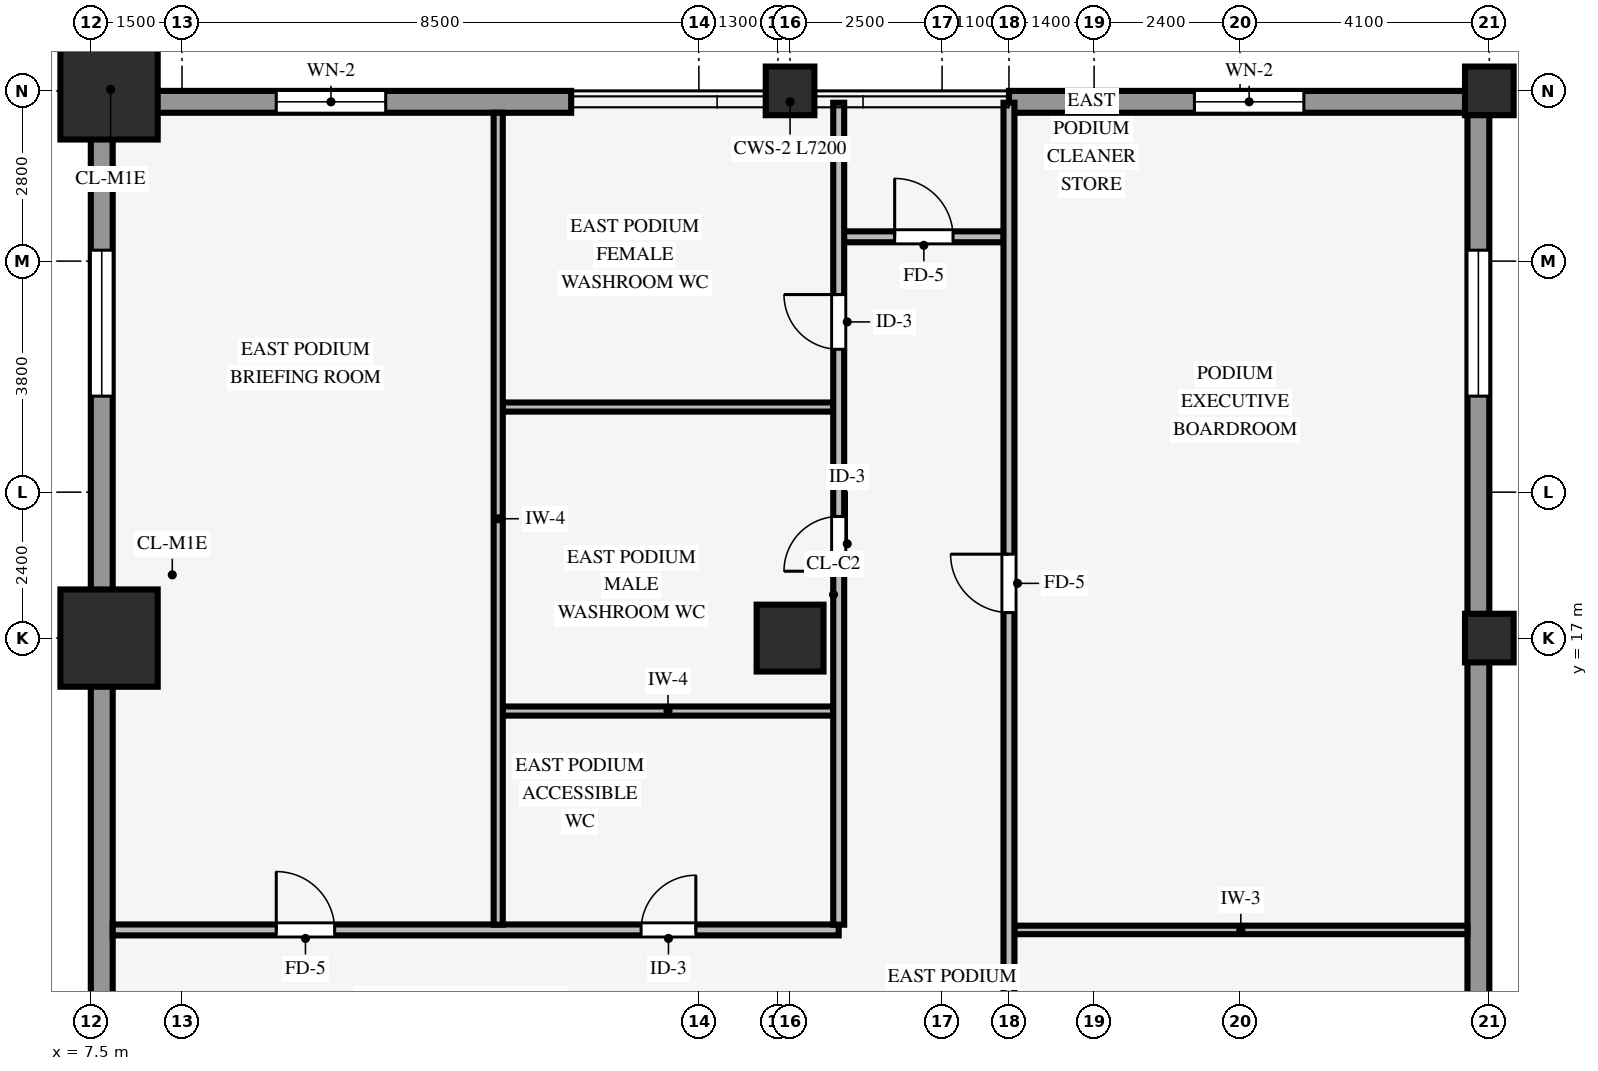
"""IFC4 building model, lengths in metres.
Left out: names, types, materials, properties, quantities, classifications, styles, units other than length and angle.
Written with IfcOpenShell. Run it as: python <this file> out.ifc"""

import sys

from ifc_helpers import new_model, si_unit, direction, frame, frame_2d, origin, origin_2d, place, context, subcontext, project, spatial, rectangle, hollow_rectangle, extrude, source, transform, mapped, element, fill, save


model = new_model("IFC4")
c1 = context("Model", 3, precision=1e-05, world=origin(), true_north=direction((0.0, 1.0)))
c2 = subcontext(c1, "Body", "Model", "MODEL_VIEW")
j1 = project(units=[si_unit("LENGTHUNIT", "METRE"), si_unit("PLANEANGLEUNIT", "RADIAN")], contexts=[c1])
p1 = place(None, origin())
s1 = spatial("IfcSite", under=j1, at=p1, CompositionType="ELEMENT")
p2 = place(p1, origin())
s2 = spatial("IfcBuilding", under=s1, at=p2, CompositionType="ELEMENT")
p3 = place(p2, frame((0.0, 0.0, 9.2)))
s3 = spatial("IfcBuildingStorey", under=s2, at=p3, CompositionType="ELEMENT", Elevation=9.2)
for number, where, z_axis, x_axis in (
    (1, (7.8, 17.0, 0.0), (0.0, 0.0, 1.0), (1.0, 0.0, 0.0)),
    (2, (7.8, 26.0, 0.0), (0.0, 0.0, 1.0), (1.0, 0.0, 0.0)),
):
    element("IfcColumn", number, at=place(p3, frame(where, z_axis=z_axis, x_axis=x_axis)), inside=s3, PredefinedType="COLUMN", context=c2, shape_type="SweptSolid", body=[
        extrude(rectangle(XDim=1.6, YDim=1.6, at=origin_2d()), origin(), (0.0, 0.0, 1.0), 4.28),
    ])
p4 = place(p3, frame((19.0, 17.0, 0.0), z_axis=(0.0, 0.0, 1.0), x_axis=(1.0, 0.0, 0.0)))
e3 = element("IfcColumn", 3, at=p4, inside=s3, PredefinedType="COLUMN", context=c2, shape_type="SweptSolid", body=[
    extrude(rectangle(XDim=1.1, YDim=1.1, at=origin_2d()), origin(), (0.0, 0.0, 1.0), 4.28),
])
for number, where, z_axis, x_axis in (
    (4, (19.0, 26.0, 0.0), (0.0, 0.0, 1.0), (1.0, 0.0, 0.0)),
    (5, (30.5, 17.0, 0.0), (0.0, 0.0, 1.0), (1.0, 0.0, 0.0)),
    (6, (30.5, 26.0, 0.0), (0.0, 0.0, 1.0), (1.0, 0.0, 0.0)),
):
    element("IfcColumn", number, at=place(p3, frame(where, z_axis=z_axis, x_axis=x_axis)), inside=s3, PredefinedType="COLUMN", context=c2, shape_type="SweptSolid", body=[
        extrude(hollow_rectangle(XDim=0.8, YDim=0.8, WallThickness=0.055, InnerFilletRadius=0.055, OuterFilletRadius=0.11, at=origin_2d()), origin(), (0.0, 0.0, 1.0), 4.28),
    ])
p5 = place(p3, frame((30.32, -25.644, 0.0), z_axis=(0.0, 0.0, 1.0), x_axis=(0.0, 1.0, 0.0)))
e7 = element("IfcWall", 7, at=p5, inside=s3, PredefinedType="STANDARD", context=c2, shape_type="SweptSolid", body=[
    extrude(rectangle(XDim=51.288, YDim=0.36, at=frame_2d((25.644, 0.0))), origin(), (0.0, 0.0, 1.0), 3.615),
])
p6 = place(p5, frame((2.264, 0.0, 0.85)))
e8 = element("IfcOpeningElement", 8, at=p6, cuts=e7, PredefinedType="OPENING", context=c2, shape_type="SweptSolid", body=[
    extrude(rectangle(XDim=2.4, YDim=2.45, at=frame_2d((1.2, 1.225))), frame((0.0, 0.19, 0.0), z_axis=(0.0, -1.0, 0.0), x_axis=(1.0, 0.0, 0.0)), (0.0, 0.0, 1.0), 0.38),
])
p7 = place(p5, frame((17.051, 0.0, 0.85)))
e9 = element("IfcOpeningElement", 9, at=p7, cuts=e7, PredefinedType="OPENING", context=c2, shape_type="SweptSolid", body=[
    extrude(rectangle(XDim=2.4, YDim=2.45, at=frame_2d((1.2, 1.225))), frame((0.0, 0.19, 0.0), z_axis=(0.0, -1.0, 0.0), x_axis=(1.0, 0.0, 0.0)), (0.0, 0.0, 1.0), 0.38),
])
p8 = place(p5, frame((21.979, 0.0, 0.85)))
e10 = element("IfcOpeningElement", 10, at=p8, cuts=e7, PredefinedType="OPENING", context=c2, shape_type="SweptSolid", body=[
    extrude(rectangle(XDim=2.4, YDim=2.45, at=frame_2d((1.2, 1.225))), frame((0.0, 0.19, 0.0), z_axis=(0.0, -1.0, 0.0), x_axis=(1.0, 0.0, 0.0)), (0.0, 0.0, 1.0), 0.38),
])
p9 = place(p5, frame((26.908, 0.0, 0.85)))
e11 = element("IfcOpeningElement", 11, at=p9, cuts=e7, PredefinedType="OPENING", context=c2, shape_type="SweptSolid", body=[
    extrude(rectangle(XDim=2.4, YDim=2.45, at=frame_2d((1.2, 1.225))), frame((0.0, 0.19, 0.0), z_axis=(0.0, -1.0, 0.0), x_axis=(1.0, 0.0, 0.0)), (0.0, 0.0, 1.0), 0.38),
])
p10 = place(p5, frame((31.837, 0.0, 0.85)))
e12 = element("IfcOpeningElement", 12, at=p10, cuts=e7, PredefinedType="OPENING", context=c2, shape_type="SweptSolid", body=[
    extrude(rectangle(XDim=2.4, YDim=2.45, at=frame_2d((1.2, 1.225))), frame((0.0, 0.19, 0.0), z_axis=(0.0, -1.0, 0.0), x_axis=(1.0, 0.0, 0.0)), (0.0, 0.0, 1.0), 0.38),
])
p11 = place(p5, frame((46.624, 0.0, 0.85)))
e13 = element("IfcOpeningElement", 13, at=p11, cuts=e7, PredefinedType="OPENING", context=c2, shape_type="SweptSolid", body=[
    extrude(rectangle(XDim=2.4, YDim=2.45, at=frame_2d((1.2, 1.225))), frame((0.0, 0.19, 0.0), z_axis=(0.0, -1.0, 0.0), x_axis=(1.0, 0.0, 0.0)), (0.0, 0.0, 1.0), 0.38),
])
p12 = place(p3, frame((7.5, 25.82, 0.0), z_axis=(0.0, 0.0, 1.0), x_axis=(1.0, 0.0, 0.0)))
e14 = element("IfcWall", 14, at=p12, inside=s3, PredefinedType="STANDARD", context=c2, shape_type="SweptSolid", body=[
    extrude(rectangle(XDim=7.9, YDim=0.36, at=frame_2d((3.95, 0.0))), origin(), (0.0, 0.0, 1.0), 3.615),
])
p13 = place(p12, frame((3.05, 0.0, 0.85)))
e15 = element("IfcOpeningElement", 15, at=p13, cuts=e14, PredefinedType="OPENING", context=c2, shape_type="SweptSolid", body=[
    extrude(rectangle(XDim=1.8, YDim=2.35, at=frame_2d((0.9, 1.175))), frame((0.0, 0.19, 0.0), z_axis=(0.0, -1.0, 0.0), x_axis=(1.0, 0.0, 0.0)), (0.0, 0.0, 1.0), 0.38),
])
p14 = place(p3, frame((22.6, 25.82, 0.0), z_axis=(0.0, 0.0, 1.0), x_axis=(1.0, 0.0, 0.0)))
e16 = element("IfcWall", 16, at=p14, inside=s3, PredefinedType="STANDARD", context=c2, shape_type="SweptSolid", body=[
    extrude(rectangle(XDim=7.9, YDim=0.36, at=frame_2d((3.95, 0.0))), origin(), (0.0, 0.0, 1.0), 3.615),
])
p15 = place(p14, frame((3.05, 0.0, 0.85)))
e17 = element("IfcOpeningElement", 17, at=p15, cuts=e16, PredefinedType="OPENING", context=c2, shape_type="SweptSolid", body=[
    extrude(rectangle(XDim=1.8, YDim=2.35, at=frame_2d((0.9, 1.175))), frame((0.0, 0.19, 0.0), z_axis=(0.0, -1.0, 0.0), x_axis=(1.0, 0.0, 0.0)), (0.0, 0.0, 1.0), 0.38),
])
p16 = place(p3, frame((7.68, -25.644, 0.0), z_axis=(0.0, 0.0, 1.0), x_axis=(0.0, 1.0, 0.0)))
e18 = element("IfcWall", 18, at=p16, inside=s3, PredefinedType="STANDARD", context=c2, shape_type="SweptSolid", body=[
    extrude(rectangle(XDim=51.288, YDim=0.36, at=frame_2d((25.644, 0.0))), origin(), (0.0, 0.0, 1.0), 3.649),
])
p17 = place(p16, frame((2.264, 0.0, 0.85)))
e19 = element("IfcOpeningElement", 19, at=p17, cuts=e18, PredefinedType="OPENING", context=c2, shape_type="SweptSolid", body=[
    extrude(rectangle(XDim=2.4, YDim=2.45, at=frame_2d((1.2, 1.225))), frame((0.0, 0.19, 0.0), z_axis=(0.0, -1.0, 0.0), x_axis=(1.0, 0.0, 0.0)), (0.0, 0.0, 1.0), 0.38),
])
p18 = place(p16, frame((17.051, 0.0, 0.85)))
e20 = element("IfcOpeningElement", 20, at=p18, cuts=e18, PredefinedType="OPENING", context=c2, shape_type="SweptSolid", body=[
    extrude(rectangle(XDim=2.4, YDim=2.45, at=frame_2d((1.2, 1.225))), frame((0.0, 0.19, 0.0), z_axis=(0.0, -1.0, 0.0), x_axis=(1.0, 0.0, 0.0)), (0.0, 0.0, 1.0), 0.38),
])
p19 = place(p16, frame((21.979, 0.0, 0.85)))
e21 = element("IfcOpeningElement", 21, at=p19, cuts=e18, PredefinedType="OPENING", context=c2, shape_type="SweptSolid", body=[
    extrude(rectangle(XDim=2.4, YDim=2.45, at=frame_2d((1.2, 1.225))), frame((0.0, 0.19, 0.0), z_axis=(0.0, -1.0, 0.0), x_axis=(1.0, 0.0, 0.0)), (0.0, 0.0, 1.0), 0.38),
])
p20 = place(p16, frame((26.908, 0.0, 0.85)))
e22 = element("IfcOpeningElement", 22, at=p20, cuts=e18, PredefinedType="OPENING", context=c2, shape_type="SweptSolid", body=[
    extrude(rectangle(XDim=2.4, YDim=2.45, at=frame_2d((1.2, 1.225))), frame((0.0, 0.19, 0.0), z_axis=(0.0, -1.0, 0.0), x_axis=(1.0, 0.0, 0.0)), (0.0, 0.0, 1.0), 0.38),
])
p21 = place(p16, frame((31.837, 0.0, 0.85)))
e23 = element("IfcOpeningElement", 23, at=p21, cuts=e18, PredefinedType="OPENING", context=c2, shape_type="SweptSolid", body=[
    extrude(rectangle(XDim=2.4, YDim=2.45, at=frame_2d((1.2, 1.225))), frame((0.0, 0.19, 0.0), z_axis=(0.0, -1.0, 0.0), x_axis=(1.0, 0.0, 0.0)), (0.0, 0.0, 1.0), 0.38),
])
p22 = place(p16, frame((46.624, 0.0, 0.85)))
e24 = element("IfcOpeningElement", 24, at=p22, cuts=e18, PredefinedType="OPENING", context=c2, shape_type="SweptSolid", body=[
    extrude(rectangle(XDim=2.4, YDim=2.45, at=frame_2d((1.2, 1.225))), frame((0.0, 0.19, 0.0), z_axis=(0.0, -1.0, 0.0), x_axis=(1.0, 0.0, 0.0)), (0.0, 0.0, 1.0), 0.38),
])
p23 = place(p3, frame((7.86, 12.2, 0.0), z_axis=(0.0, 0.0, 1.0), x_axis=(1.0, 0.0, 0.0)))
e25 = element("IfcWall", 25, at=p23, inside=s3, PredefinedType="PARTITIONING", context=c2, shape_type="SweptSolid", body=[
    extrude(rectangle(XDim=11.94, YDim=0.18, at=frame_2d((5.97, 0.0))), origin(), (0.0, 0.0, 1.0), 4.27),
])
p24 = place(p23, frame((2.69, 0.0, 0.0)))
e26 = element("IfcOpeningElement", 26, at=p24, cuts=e25, PredefinedType="OPENING", context=c2, shape_type="SweptSolid", body=[
    extrude(rectangle(XDim=0.96, YDim=2.1, at=frame_2d((0.48, 1.05))), frame((0.0, 0.1, 0.0), z_axis=(0.0, -1.0, 0.0), x_axis=(1.0, 0.0, 0.0)), (0.0, 0.0, 1.0), 0.2),
])
p25 = place(p23, frame((8.69, 0.0, 0.0)))
e27 = element("IfcOpeningElement", 27, at=p25, cuts=e25, PredefinedType="OPENING", context=c2, shape_type="SweptSolid", body=[
    extrude(rectangle(XDim=0.9, YDim=2.1, at=frame_2d((0.45, 1.05))), frame((0.0, 0.1, 0.0), z_axis=(0.0, -1.0, 0.0), x_axis=(1.0, 0.0, 0.0)), (0.0, 0.0, 1.0), 0.2),
])
p26 = place(p3, frame((22.686, 12.2, 0.0), z_axis=(0.0, 0.0, 1.0), x_axis=(1.0, 0.0, 0.0)))
e28 = element("IfcWall", 28, at=p26, inside=s3, PredefinedType="PARTITIONING", context=c2, shape_type="SweptSolid", body=[
    extrude(rectangle(XDim=7.454, YDim=0.14, at=frame_2d((3.727, 0.0))), origin(), (0.0, 0.0, 1.0), 4.27),
])
for number, where, z_axis, x_axis in (
    (29, (14.271, 15.8, 0.0), (0.0, 0.0, 1.0), (1.0, 0.0, 0.0)),
    (30, (14.271, 20.8, 0.0), (0.0, 0.0, 1.0), (1.0, 0.0, 0.0)),
):
    element("IfcWall", number, at=place(p3, frame(where, z_axis=z_axis, x_axis=x_axis)), inside=s3, PredefinedType="PARTITIONING", context=c2, shape_type="SweptSolid", body=[
        extrude(rectangle(XDim=5.443, YDim=0.15, at=frame_2d((2.722, 0.0))), origin(), (0.0, 0.0, 1.0), 4.27),
    ])
p27 = place(p3, frame((19.886, 23.6, 0.0), z_axis=(0.0, 0.0, 1.0), x_axis=(1.0, 0.0, 0.0)))
e31 = element("IfcWall", 31, at=p27, inside=s3, PredefinedType="PARTITIONING", context=c2, shape_type="SweptSolid", body=[
    extrude(rectangle(XDim=2.628, YDim=0.18, at=frame_2d((1.314, 0.0))), origin(), (0.0, 0.0, 1.0), 4.27),
])
p28 = place(p27, frame((0.834, 0.0, 0.0)))
e32 = element("IfcOpeningElement", 32, at=p28, cuts=e31, PredefinedType="OPENING", context=c2, shape_type="SweptSolid", body=[
    extrude(rectangle(XDim=0.96, YDim=2.1, at=frame_2d((0.48, 1.05))), frame((0.0, 0.1, 0.0), z_axis=(0.0, -1.0, 0.0), x_axis=(1.0, 0.0, 0.0)), (0.0, 0.0, 1.0), 0.2),
])
p29 = place(p3, frame((14.2, 12.286, 0.0), z_axis=(0.0, 0.0, 1.0), x_axis=(0.0, 1.0, 0.0)))
e33 = element("IfcWall", 33, at=p29, inside=s3, PredefinedType="PARTITIONING", context=c2, shape_type="SweptSolid", body=[
    extrude(rectangle(XDim=13.354, YDim=0.15, at=frame_2d((6.677, 0.0))), origin(), (0.0, 0.0, 1.0), 4.27),
])
p30 = place(p3, frame((19.8, 12.286, 0.0), z_axis=(0.0, 0.0, 1.0), x_axis=(0.0, 1.0, 0.0)))
e34 = element("IfcWall", 34, at=p30, inside=s3, PredefinedType="PARTITIONING", context=c2, shape_type="SweptSolid", body=[
    extrude(rectangle(XDim=13.519, YDim=0.18, at=frame_2d((6.76, 0.0))), origin(), (0.0, 0.0, 1.0), 4.27),
])
p31 = place(p30, frame((5.814, 0.0, 0.0)))
e35 = element("IfcOpeningElement", 35, at=p31, cuts=e34, PredefinedType="OPENING", context=c2, shape_type="SweptSolid", body=[
    extrude(rectangle(XDim=0.9, YDim=2.1, at=frame_2d((0.45, 1.05))), frame((0.0, 0.1, 0.0), z_axis=(0.0, -1.0, 0.0), x_axis=(1.0, 0.0, 0.0)), (0.0, 0.0, 1.0), 0.2),
])
p32 = place(p30, frame((9.464, 0.0, 0.0)))
e36 = element("IfcOpeningElement", 36, at=p32, cuts=e34, PredefinedType="OPENING", context=c2, shape_type="SweptSolid", body=[
    extrude(rectangle(XDim=0.9, YDim=2.1, at=frame_2d((0.45, 1.05))), frame((0.0, 0.1, 0.0), z_axis=(0.0, -1.0, 0.0), x_axis=(1.0, 0.0, 0.0)), (0.0, 0.0, 1.0), 0.2),
])
p33 = place(p3, frame((22.6, -12.114, 0.0), z_axis=(0.0, 0.0, 1.0), x_axis=(0.0, 1.0, 0.0)))
e37 = element("IfcWall", 37, at=p33, inside=s3, PredefinedType="PARTITIONING", context=c2, shape_type="SweptSolid", body=[
    extrude(rectangle(XDim=37.919, YDim=0.18, at=frame_2d((18.959, 0.0))), origin(), (0.0, 0.0, 1.0), 4.27),
])
p34 = place(p33, frame((11.634, 0.0, 0.0)))
e38 = element("IfcOpeningElement", 38, at=p34, cuts=e37, PredefinedType="OPENING", context=c2, shape_type="SweptSolid", body=[
    extrude(rectangle(XDim=0.96, YDim=2.1, at=frame_2d((0.48, 1.05))), frame((0.0, 0.1, 0.0), z_axis=(0.0, -1.0, 0.0), x_axis=(1.0, 0.0, 0.0)), (0.0, 0.0, 1.0), 0.2),
])
p35 = place(p33, frame((29.534, 0.0, 0.0)))
e39 = element("IfcOpeningElement", 39, at=p35, cuts=e37, PredefinedType="OPENING", context=c2, shape_type="SweptSolid", body=[
    extrude(rectangle(XDim=0.96, YDim=2.1, at=frame_2d((0.48, 1.05))), frame((0.0, 0.1, 0.0), z_axis=(0.0, -1.0, 0.0), x_axis=(1.0, 0.0, 0.0)), (0.0, 0.0, 1.0), 0.2),
])
m1 = source(origin(), c2, "Body", "SweptSolid", [
    extrude(rectangle(XDim=2.4, YDim=2.45, at=frame_2d((1.2, 1.225))), frame((0.0, 0.03, 0.0), z_axis=(0.0, -1.0, 0.0), x_axis=(1.0, 0.0, 0.0)), (0.0, 0.0, 1.0), 0.06),
])
p36 = place(p11, origin())
e40 = element("IfcWindow", 40, at=p36, inside=s3, PartitioningType="SINGLE_PANEL", PredefinedType="WINDOW", context=c2, shape_type="MappedRepresentation", body=[
    mapped(m1, transform((0.0, 0.0, 0.0), scale=1.0)),
])
fill(e13, e40)
m2 = source(origin(), c2, "Body", "SweptSolid", [
    extrude(rectangle(XDim=1.8, YDim=2.35, at=frame_2d((0.9, 1.175))), frame((0.0, 0.03, 0.0), z_axis=(0.0, -1.0, 0.0), x_axis=(1.0, 0.0, 0.0)), (0.0, 0.0, 1.0), 0.06),
])
p37 = place(p13, origin())
e41 = element("IfcWindow", 41, at=p37, inside=s3, PartitioningType="SINGLE_PANEL", PredefinedType="WINDOW", context=c2, shape_type="MappedRepresentation", body=[
    mapped(m2, transform((0.0, 0.0, 0.0), scale=1.0)),
])
fill(e15, e41)
p38 = place(p15, origin())
e42 = element("IfcWindow", 42, at=p38, inside=s3, PartitioningType="SINGLE_PANEL", PredefinedType="WINDOW", context=c2, shape_type="MappedRepresentation", body=[
    mapped(m2, transform((0.0, 0.0, 0.0), scale=1.0)),
])
fill(e17, e42)
p39 = place(p22, origin())
e43 = element("IfcWindow", 43, at=p39, inside=s3, PartitioningType="SINGLE_PANEL", PredefinedType="WINDOW", context=c2, shape_type="MappedRepresentation", body=[
    mapped(m1, transform((0.0, 0.0, 0.0), scale=1.0)),
])
fill(e24, e43)
m3 = source(origin(), c2, "Body", "SweptSolid", [
    extrude(rectangle(XDim=0.96, YDim=2.1, at=frame_2d((0.48, 1.05))), frame((0.0, 0.025, 0.0), z_axis=(0.0, -1.0, 0.0), x_axis=(1.0, 0.0, 0.0)), (0.0, 0.0, 1.0), 0.05),
])
p40 = place(p35, origin())
e44 = element("IfcDoor", 44, at=p40, inside=s3, OperationType="SINGLE_SWING_RIGHT", PredefinedType="DOOR", context=c2, shape_type="MappedRepresentation", body=[
    mapped(m3, transform((0.0, 0.0, 0.0), scale=1.0)),
])
fill(e39, e44)
p41 = place(p24, origin())
e45 = element("IfcDoor", 45, at=p41, inside=s3, OperationType="SINGLE_SWING_LEFT", PredefinedType="DOOR", context=c2, shape_type="MappedRepresentation", body=[
    mapped(m3, transform((0.0, 0.0, 0.0), scale=1.0)),
])
fill(e26, e45)
m4 = source(origin(), c2, "Body", "SweptSolid", [
    extrude(rectangle(XDim=0.9, YDim=2.1, at=frame_2d((0.45, 1.05))), frame((0.0, 0.025, 0.0), z_axis=(0.0, -1.0, 0.0), x_axis=(1.0, 0.0, 0.0)), (0.0, 0.0, 1.0), 0.05),
])
p42 = place(p25, origin())
e46 = element("IfcDoor", 46, at=p42, inside=s3, OperationType="SINGLE_SWING_RIGHT", PredefinedType="DOOR", context=c2, shape_type="MappedRepresentation", body=[
    mapped(m4, transform((0.0, 0.0, 0.0), scale=1.0)),
])
fill(e27, e46)
p43 = place(p31, origin())
e47 = element("IfcDoor", 47, at=p43, inside=s3, OperationType="SINGLE_SWING_LEFT", PredefinedType="DOOR", context=c2, shape_type="MappedRepresentation", body=[
    mapped(m4, transform((0.0, 0.0, 0.0), scale=1.0)),
])
fill(e35, e47)
p44 = place(p32, origin())
e48 = element("IfcDoor", 48, at=p44, inside=s3, OperationType="SINGLE_SWING_RIGHT", PredefinedType="DOOR", context=c2, shape_type="MappedRepresentation", body=[
    mapped(m4, transform((0.0, 0.0, 0.0), scale=1.0)),
])
fill(e36, e48)
p45 = place(p28, origin())
e49 = element("IfcDoor", 49, at=p45, inside=s3, OperationType="SINGLE_SWING_LEFT", PredefinedType="DOOR", context=c2, shape_type="MappedRepresentation", body=[
    mapped(m3, transform((0.0, 0.0, 0.0), scale=1.0)),
])
fill(e32, e49)
save(model, sys.argv[1])
